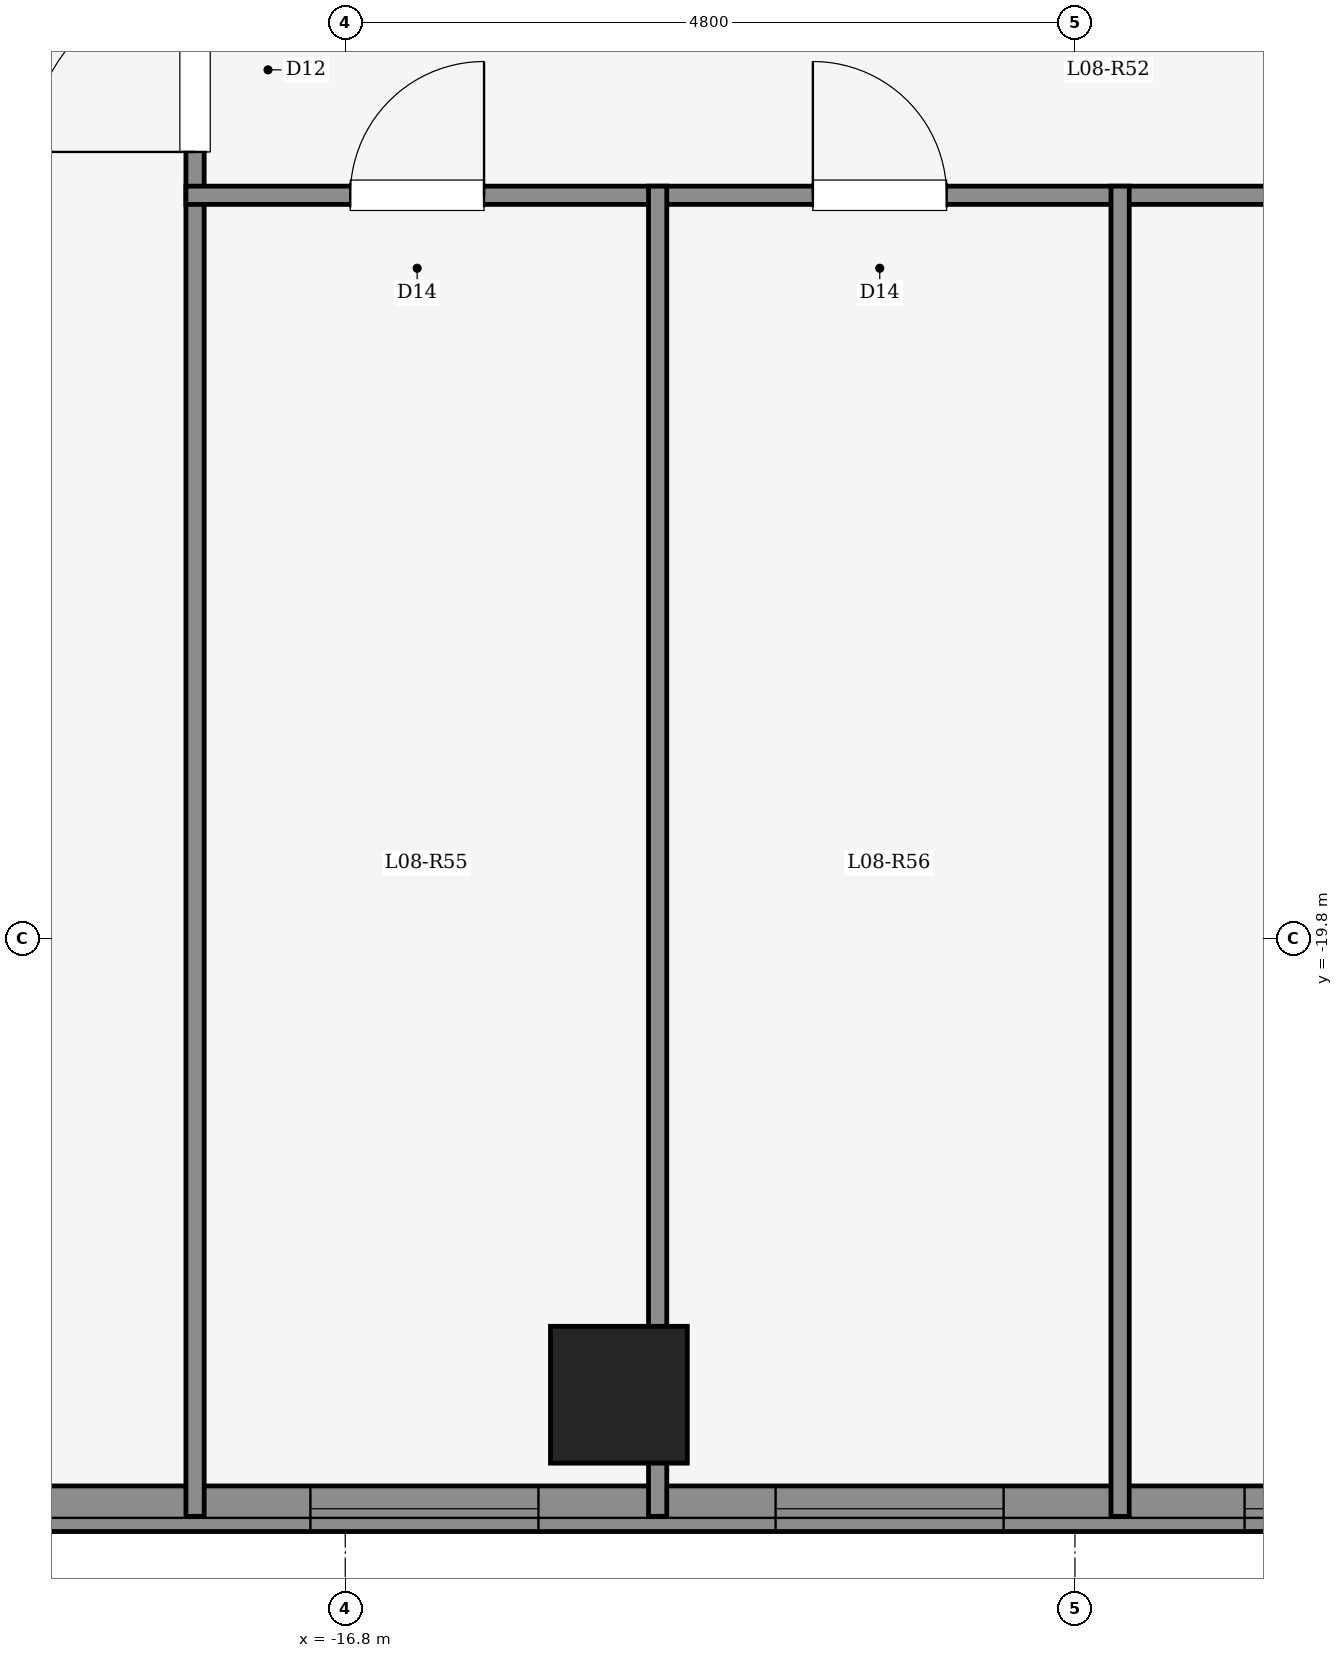
"""IFC4 building model, lengths in metres.
Left out: names, types, materials, properties, quantities, classifications, styles, units other than length and angle.
Written with IfcOpenShell. Run it as: python <this file> out.ifc"""

import sys

from ifc_helpers import new_model, si_unit, direction, frame, frame_2d, origin, origin_2d, place, context, subcontext, project, spatial, rectangle, extrude, element, fill, save


model = new_model("IFC4")
c1 = context("Model", 3, precision=1e-05, world=origin(), true_north=direction((0.0, 1.0)))
c2 = subcontext(c1, "Body", "Model", "MODEL_VIEW")
j1 = project(units=[si_unit("LENGTHUNIT", "METRE"), si_unit("PLANEANGLEUNIT", "RADIAN")], contexts=[c1])
p1 = place(None, origin())
s1 = spatial("IfcSite", under=j1, at=p1, CompositionType="ELEMENT")
p2 = place(p1, origin())
s2 = spatial("IfcBuilding", under=s1, at=p2, CompositionType="ELEMENT")
p3 = place(p2, frame((0.0, 0.0, 34.05)))
s3 = spatial("IfcBuildingStorey", under=s2, at=p3, CompositionType="ELEMENT", Elevation=34.05)
p4 = place(p3, frame((-15.0, -22.8, 0.0), z_axis=(0.0, 0.0, 1.0), x_axis=(1.0, 0.0, 0.0)))
e1 = element("IfcColumn", 1, at=p4, inside=s3, PredefinedType="COLUMN", context=c2, shape_type="SweptSolid", body=[
    extrude(rectangle(XDim=1.2, YDim=1.2, at=origin_2d()), origin(), (0.0, 0.0, 1.0), 3.35),
])
p5 = place(p3, frame((-7.35, -23.55, 0.0), z_axis=(0.0, 0.0, 1.0), x_axis=(-1.0, 0.0, 0.0)))
e2 = element("IfcWall", 2, at=p5, inside=s3, PredefinedType="SOLIDWALL", context=c2, shape_type="SweptSolid", body=[
    extrude(rectangle(XDim=15.3, YDim=0.3, at=frame_2d((7.65, 0.0))), origin(), (0.0, 0.0, 1.0), 3.1),
])
p6 = place(p5, frame((0.147, 0.0, 0.95)))
e3 = element("IfcOpeningElement", 3, at=p6, cuts=e2, PredefinedType="OPENING", context=c2, shape_type="SweptSolid", body=[
    extrude(rectangle(XDim=0.85, YDim=1.5, at=frame_2d((0.425, 0.75))), frame((0.0, 0.16, 0.0), z_axis=(0.0, -1.0, 0.0), x_axis=(1.0, 0.0, 0.0)), (0.0, 0.0, 1.0), 0.32),
])
p7 = place(p5, frame((2.034, 0.0, 0.9)))
e4 = element("IfcOpeningElement", 4, at=p7, cuts=e2, PredefinedType="OPENING", context=c2, shape_type="SweptSolid", body=[
    extrude(rectangle(XDim=1.5, YDim=1.65, at=frame_2d((0.75, 0.825))), frame((0.0, 0.16, 0.0), z_axis=(0.0, -1.0, 0.0), x_axis=(1.0, 0.0, 0.0)), (0.0, 0.0, 1.0), 0.32),
])
p8 = place(p5, frame((5.119, 0.0, 0.9)))
e5 = element("IfcOpeningElement", 5, at=p8, cuts=e2, PredefinedType="OPENING", context=c2, shape_type="SweptSolid", body=[
    extrude(rectangle(XDim=1.5, YDim=1.65, at=frame_2d((0.75, 0.825))), frame((0.0, 0.16, 0.0), z_axis=(0.0, -1.0, 0.0), x_axis=(1.0, 0.0, 0.0)), (0.0, 0.0, 1.0), 0.32),
])
p9 = place(p5, frame((8.179, 0.0, 0.9)))
e6 = element("IfcOpeningElement", 6, at=p9, cuts=e2, PredefinedType="OPENING", context=c2, shape_type="SweptSolid", body=[
    extrude(rectangle(XDim=1.5, YDim=1.65, at=frame_2d((0.75, 0.825))), frame((0.0, 0.16, 0.0), z_axis=(0.0, -1.0, 0.0), x_axis=(1.0, 0.0, 0.0)), (0.0, 0.0, 1.0), 0.32),
])
p10 = place(p5, frame((11.642, 0.0, 0.9)))
e7 = element("IfcOpeningElement", 7, at=p10, cuts=e2, PredefinedType="OPENING", context=c2, shape_type="SweptSolid", body=[
    extrude(rectangle(XDim=2.4, YDim=1.8, at=frame_2d((1.2, 0.9))), frame((0.0, 0.16, 0.0), z_axis=(0.0, -1.0, 0.0), x_axis=(1.0, 0.0, 0.0)), (0.0, 0.0, 1.0), 0.32),
])
p11 = place(p3, frame((-17.788, -23.6, 0.0), z_axis=(0.0, 0.0, 1.0), x_axis=(0.0, 1.0, 0.0)))
e8 = element("IfcWall", 8, at=p11, inside=s3, PredefinedType="PARTITIONING", context=c2, shape_type="SweptSolid", body=[
    extrude(rectangle(XDim=13.31, YDim=0.12, at=frame_2d((6.655, 0.0))), origin(), (0.0, 0.0, 1.0), 3.1),
])
p12 = place(p11, frame((8.975, 0.0, 0.0)))
e9 = element("IfcOpeningElement", 9, at=p12, cuts=e8, PredefinedType="OPENING", context=c2, shape_type="SweptSolid", body=[
    extrude(rectangle(XDim=1.08, YDim=2.15, at=frame_2d((0.54, 1.075))), frame((0.0, 0.07, 0.0), z_axis=(0.0, -1.0, 0.0), x_axis=(1.0, 0.0, 0.0)), (0.0, 0.0, 1.0), 0.14),
])
p13 = place(p3, frame((-17.848, -14.91, 0.0), z_axis=(0.0, 0.0, 1.0), x_axis=(1.0, 0.0, 0.0)))
e10 = element("IfcWall", 10, at=p13, inside=s3, PredefinedType="PARTITIONING", context=c2, shape_type="SweptSolid", body=[
    extrude(rectangle(XDim=9.308, YDim=0.12, at=frame_2d((4.654, 0.0))), origin(), (0.0, 0.0, 1.0), 2.585),
])
p14 = place(p13, frame((1.081, 0.0, 0.0)))
e11 = element("IfcOpeningElement", 11, at=p14, cuts=e10, PredefinedType="OPENING", context=c2, shape_type="SweptSolid", body=[
    extrude(rectangle(XDim=0.88, YDim=2.1, at=frame_2d((0.44, 1.05))), frame((0.0, 0.07, 0.0), z_axis=(0.0, -1.0, 0.0), x_axis=(1.0, 0.0, 0.0)), (0.0, 0.0, 1.0), 0.14),
])
p15 = place(p13, frame((4.124, 0.0, 0.0)))
e12 = element("IfcOpeningElement", 12, at=p15, cuts=e10, PredefinedType="OPENING", context=c2, shape_type="SweptSolid", body=[
    extrude(rectangle(XDim=0.88, YDim=2.1, at=frame_2d((0.44, 1.05))), frame((0.0, 0.07, 0.0), z_axis=(0.0, -1.0, 0.0), x_axis=(1.0, 0.0, 0.0)), (0.0, 0.0, 1.0), 0.14),
])
p16 = place(p13, frame((7.167, 0.0, 0.0)))
e13 = element("IfcOpeningElement", 13, at=p16, cuts=e10, PredefinedType="OPENING", context=c2, shape_type="SweptSolid", body=[
    extrude(rectangle(XDim=0.88, YDim=2.1, at=frame_2d((0.44, 1.05))), frame((0.0, 0.07, 0.0), z_axis=(0.0, -1.0, 0.0), x_axis=(1.0, 0.0, 0.0)), (0.0, 0.0, 1.0), 0.14),
])
p17 = place(p3, frame((-14.745, -23.6, 0.0), z_axis=(0.0, 0.0, 1.0), x_axis=(0.0, 1.0, 0.0)))
e14 = element("IfcWall", 14, at=p17, inside=s3, PredefinedType="PARTITIONING", context=c2, shape_type="SweptSolid", body=[
    extrude(rectangle(XDim=8.75, YDim=0.12, at=frame_2d((4.375, 0.0))), origin(), (0.0, 0.0, 1.0), 2.435),
])
p18 = place(p3, frame((-11.703, -23.6, 0.0), z_axis=(0.0, 0.0, 1.0), x_axis=(0.0, 1.0, 0.0)))
e15 = element("IfcWall", 15, at=p18, inside=s3, PredefinedType="PARTITIONING", context=c2, shape_type="SweptSolid", body=[
    extrude(rectangle(XDim=8.75, YDim=0.12, at=frame_2d((4.375, 0.0))), origin(), (0.0, 0.0, 1.0), 3.1),
])
p19 = place(p7, origin())
e16 = element("IfcWindow", 16, at=p19, inside=s3, PartitioningType="SINGLE_PANEL", PredefinedType="WINDOW", context=c2, shape_type="SweptSolid", body=[
    extrude(rectangle(XDim=1.5, YDim=1.65, at=frame_2d((0.75, 0.825))), frame((0.0, 0.03, 0.0), z_axis=(0.0, -1.0, 0.0), x_axis=(1.0, 0.0, 0.0)), (0.0, 0.0, 1.0), 0.06),
])
fill(e4, e16)
p20 = place(p8, origin())
e17 = element("IfcWindow", 17, at=p20, inside=s3, PartitioningType="SINGLE_PANEL", PredefinedType="WINDOW", context=c2, shape_type="SweptSolid", body=[
    extrude(rectangle(XDim=1.5, YDim=1.65, at=frame_2d((0.75, 0.825))), frame((0.0, 0.03, 0.0), z_axis=(0.0, -1.0, 0.0), x_axis=(1.0, 0.0, 0.0)), (0.0, 0.0, 1.0), 0.06),
])
fill(e5, e17)
p21 = place(p9, origin())
e18 = element("IfcWindow", 18, at=p21, inside=s3, PartitioningType="SINGLE_PANEL", PredefinedType="WINDOW", context=c2, shape_type="SweptSolid", body=[
    extrude(rectangle(XDim=1.5, YDim=1.65, at=frame_2d((0.75, 0.825))), frame((0.0, 0.03, 0.0), z_axis=(0.0, -1.0, 0.0), x_axis=(1.0, 0.0, 0.0)), (0.0, 0.0, 1.0), 0.06),
])
fill(e6, e18)
p22 = place(p12, origin())
e19 = element("IfcDoor", 19, at=p22, inside=s3, OperationType="SINGLE_SWING_LEFT", PredefinedType="DOOR", context=c2, shape_type="SweptSolid", body=[
    extrude(rectangle(XDim=1.08, YDim=2.15, at=frame_2d((0.54, 1.075))), frame((0.0, 0.025, 0.0), z_axis=(0.0, -1.0, 0.0), x_axis=(1.0, 0.0, 0.0)), (0.0, 0.0, 1.0), 0.05),
])
fill(e9, e19)
p23 = place(p14, origin())
e20 = element("IfcDoor", 20, at=p23, inside=s3, OperationType="SINGLE_SWING_RIGHT", PredefinedType="DOOR", context=c2, shape_type="SweptSolid", body=[
    extrude(rectangle(XDim=0.88, YDim=2.1, at=frame_2d((0.44, 1.05))), frame((0.0, 0.025, 0.0), z_axis=(0.0, -1.0, 0.0), x_axis=(1.0, 0.0, 0.0)), (0.0, 0.0, 1.0), 0.05),
])
fill(e11, e20)
p24 = place(p15, origin())
e21 = element("IfcDoor", 21, at=p24, inside=s3, OperationType="SINGLE_SWING_LEFT", PredefinedType="DOOR", context=c2, shape_type="SweptSolid", body=[
    extrude(rectangle(XDim=0.88, YDim=2.1, at=frame_2d((0.44, 1.05))), frame((0.0, 0.025, 0.0), z_axis=(0.0, -1.0, 0.0), x_axis=(1.0, 0.0, 0.0)), (0.0, 0.0, 1.0), 0.05),
])
fill(e12, e21)
save(model, sys.argv[1])
